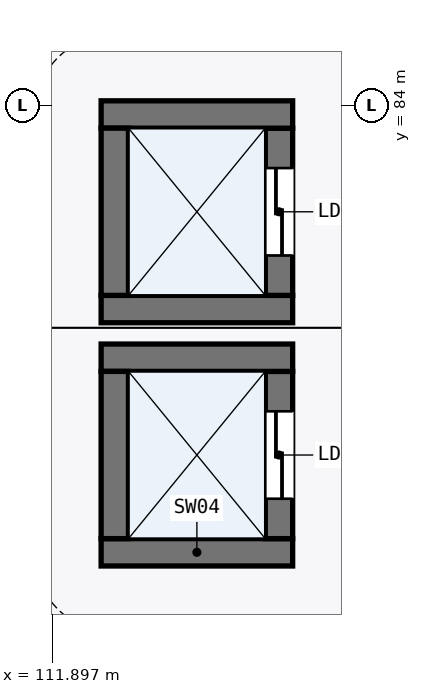
"""IFC4 building model, lengths in metres.
Left out: names, types, materials, properties, quantities, classifications, styles, units other than length and angle.
Written with IfcOpenShell. Run it as: python <this file> out.ifc"""

import sys

from ifc_helpers import new_model, si_unit, direction, frame, frame_2d, origin, place, context, subcontext, project, spatial, rectangle, extrude, element, fill, save


model = new_model("IFC4")
c1 = context("Model", 3, precision=1e-05, world=origin(), true_north=direction((0.0, 1.0)))
c2 = subcontext(c1, "Body", "Model", "MODEL_VIEW")
j1 = project(units=[si_unit("LENGTHUNIT", "METRE"), si_unit("PLANEANGLEUNIT", "RADIAN")], contexts=[c1])
p1 = place(None, origin())
s1 = spatial("IfcSite", under=j1, at=p1, CompositionType="ELEMENT")
p2 = place(p1, origin())
s2 = spatial("IfcBuilding", under=s1, at=p2, CompositionType="ELEMENT")
p3 = place(p2, frame((0.0, 0.0, 6.0)))
s3 = spatial("IfcBuildingStorey", under=s2, at=p3, CompositionType="ELEMENT", Elevation=6.0)
p4 = place(p3, frame((112.54, 78.12, 0.0), z_axis=(0.0, 0.0, 1.0), x_axis=(1.0, 0.0, 0.0)))
e1 = element("IfcWall", 1, at=p4, inside=s3, PredefinedType="SHEAR", context=c2, shape_type="SweptSolid", body=[
    extrude(rectangle(XDim=2.52, YDim=0.36, at=frame_2d((1.26, 0.0))), origin(), (0.0, 0.0, 1.0), 5.145),
])
p5 = place(p3, frame((114.88, 78.3, 0.0), z_axis=(0.0, 0.0, 1.0), x_axis=(0.0, 1.0, 0.0)))
e2 = element("IfcWall", 2, at=p5, inside=s3, PredefinedType="SHEAR", context=c2, shape_type="SweptSolid", body=[
    extrude(rectangle(XDim=2.2, YDim=0.36, at=frame_2d((1.1, 0.0))), origin(), (0.0, 0.0, 1.0), 5.145),
])
p6 = place(p5, frame((0.525, 0.0, 0.0)))
e3 = element("IfcOpeningElement", 3, at=p6, cuts=e2, PredefinedType="OPENING", context=c2, shape_type="SweptSolid", body=[
    extrude(rectangle(XDim=1.15, YDim=2.2, at=frame_2d((0.575, 1.1))), frame((0.0, 0.19, 0.0), z_axis=(0.0, -1.0, 0.0), x_axis=(1.0, 0.0, 0.0)), (0.0, 0.0, 1.0), 0.38),
])
p7 = place(p3, frame((115.06, 80.68, 0.0), z_axis=(0.0, 0.0, 1.0), x_axis=(-1.0, 0.0, 0.0)))
e4 = element("IfcWall", 4, at=p7, inside=s3, PredefinedType="SHEAR", context=c2, shape_type="SweptSolid", body=[
    extrude(rectangle(XDim=2.52, YDim=0.36, at=frame_2d((1.26, 0.0))), origin(), (0.0, 0.0, 1.0), 5.145),
])
p8 = place(p3, frame((112.72, 80.5, 0.0), z_axis=(0.0, 0.0, 1.0), x_axis=(0.0, -1.0, 0.0)))
e5 = element("IfcWall", 5, at=p8, inside=s3, PredefinedType="SHEAR", context=c2, shape_type="SweptSolid", body=[
    extrude(rectangle(XDim=2.2, YDim=0.36, at=frame_2d((1.1, 0.0))), origin(), (0.0, 0.0, 1.0), 5.145),
])
p9 = place(p3, frame((112.54, 81.32, 0.0), z_axis=(0.0, 0.0, 1.0), x_axis=(1.0, 0.0, 0.0)))
e6 = element("IfcWall", 6, at=p9, inside=s3, PredefinedType="SHEAR", context=c2, shape_type="SweptSolid", body=[
    extrude(rectangle(XDim=2.52, YDim=0.36, at=frame_2d((1.26, 0.0))), origin(), (0.0, 0.0, 1.0), 5.145),
])
p10 = place(p3, frame((114.88, 81.5, 0.0), z_axis=(0.0, 0.0, 1.0), x_axis=(0.0, 1.0, 0.0)))
e7 = element("IfcWall", 7, at=p10, inside=s3, PredefinedType="SHEAR", context=c2, shape_type="SweptSolid", body=[
    extrude(rectangle(XDim=2.2, YDim=0.36, at=frame_2d((1.1, 0.0))), origin(), (0.0, 0.0, 1.0), 5.145),
])
p11 = place(p10, frame((0.525, 0.0, 0.0)))
e8 = element("IfcOpeningElement", 8, at=p11, cuts=e7, PredefinedType="OPENING", context=c2, shape_type="SweptSolid", body=[
    extrude(rectangle(XDim=1.15, YDim=2.2, at=frame_2d((0.575, 1.1))), frame((0.0, 0.19, 0.0), z_axis=(0.0, -1.0, 0.0), x_axis=(1.0, 0.0, 0.0)), (0.0, 0.0, 1.0), 0.38),
])
p12 = place(p3, frame((115.06, 83.88, 0.0), z_axis=(0.0, 0.0, 1.0), x_axis=(-1.0, 0.0, 0.0)))
e9 = element("IfcWall", 9, at=p12, inside=s3, PredefinedType="SHEAR", context=c2, shape_type="SweptSolid", body=[
    extrude(rectangle(XDim=2.52, YDim=0.36, at=frame_2d((1.26, 0.0))), origin(), (0.0, 0.0, 1.0), 5.145),
])
p13 = place(p3, frame((112.72, 83.7, 0.0), z_axis=(0.0, 0.0, 1.0), x_axis=(0.0, -1.0, 0.0)))
e10 = element("IfcWall", 10, at=p13, inside=s3, PredefinedType="SHEAR", context=c2, shape_type="SweptSolid", body=[
    extrude(rectangle(XDim=2.2, YDim=0.36, at=frame_2d((1.1, 0.0))), origin(), (0.0, 0.0, 1.0), 5.145),
])
p14 = place(p6, frame((1.15, 0.0, 0.0), z_axis=(0.0, 0.0, 1.0), x_axis=(-1.0, 0.0, 0.0)))
e11 = element("IfcDoor", 11, at=p14, inside=s3, OperationType="DOUBLE_DOOR_SLIDING", PredefinedType="DOOR", context=c2, shape_type="SweptSolid", body=[
    extrude(rectangle(XDim=1.15, YDim=2.2, at=frame_2d((0.575, 1.1))), frame((0.0, 0.025, 0.0), z_axis=(0.0, -1.0, 0.0), x_axis=(1.0, 0.0, 0.0)), (0.0, 0.0, 1.0), 0.05),
])
fill(e3, e11)
p15 = place(p11, frame((1.15, 0.0, 0.0), z_axis=(0.0, 0.0, 1.0), x_axis=(-1.0, 0.0, 0.0)))
e12 = element("IfcDoor", 12, at=p15, inside=s3, OperationType="DOUBLE_DOOR_SLIDING", PredefinedType="DOOR", context=c2, shape_type="SweptSolid", body=[
    extrude(rectangle(XDim=1.15, YDim=2.2, at=frame_2d((0.575, 1.1))), frame((0.0, 0.025, 0.0), z_axis=(0.0, -1.0, 0.0), x_axis=(1.0, 0.0, 0.0)), (0.0, 0.0, 1.0), 0.05),
])
fill(e8, e12)
save(model, sys.argv[1])
